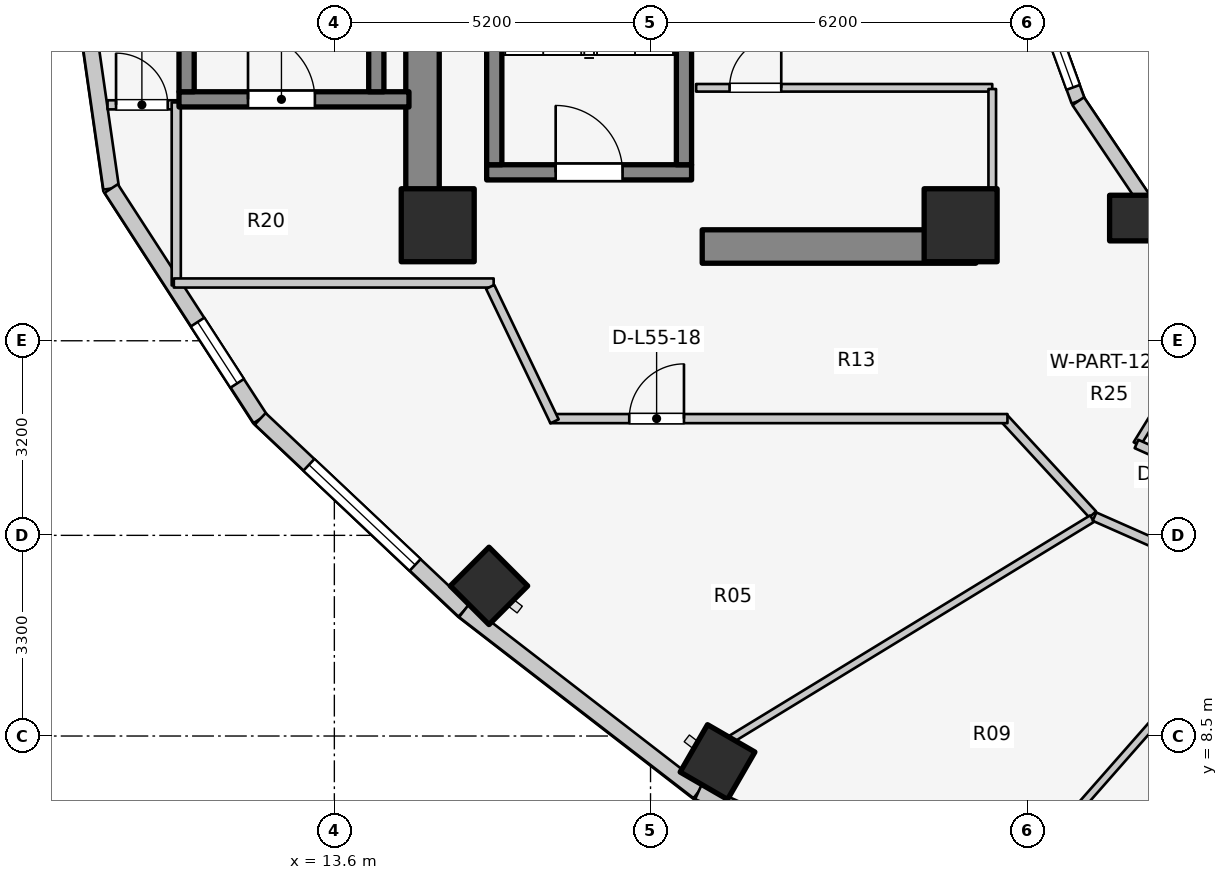
"""IFC4 building model, lengths in metres.
Left out: names, types, materials, properties, quantities, classifications, styles, units other than length and angle.
Written with IfcOpenShell. Run it as: python <this file> out.ifc"""

import sys

from ifc_helpers import new_model, si_unit, direction, frame, frame_2d, origin, origin_2d, place, context, subcontext, project, spatial, rectangle, extrude, element, fill, save


model = new_model("IFC4")
c1 = context("Model", 3, precision=1e-05, world=origin(), true_north=direction((0.0, 1.0)))
c2 = subcontext(c1, "Body", "Model", "MODEL_VIEW")
j1 = project(units=[si_unit("LENGTHUNIT", "METRE"), si_unit("PLANEANGLEUNIT", "RADIAN")], contexts=[c1])
p1 = place(None, origin())
s1 = spatial("IfcSite", under=j1, at=p1, CompositionType="ELEMENT")
p2 = place(p1, origin())
s2 = spatial("IfcBuilding", under=s1, at=p2, CompositionType="ELEMENT")
p3 = place(p2, frame((0.0, 0.0, 180.8)))
s3 = spatial("IfcBuildingStorey", under=s2, at=p3, CompositionType="ELEMENT", Elevation=180.8)
p4 = place(p3, frame((15.05, 17.05, 0.0), z_axis=(0.0, 0.0, 1.0), x_axis=(0.0, 1.0, 0.0)))
e1 = element("IfcWall", 1, at=p4, inside=s3, PredefinedType="SHEAR", context=c2, shape_type="SweptSolid", body=[
    extrude(rectangle(XDim=12.8, YDim=0.55, at=frame_2d((6.4, 0.0))), origin(), (0.0, 0.0, 1.0), 3.1),
])
p5 = place(p3, frame((19.65, 16.55, 0.0), z_axis=(0.0, 0.0, 1.0), x_axis=(1.0, 0.0, 0.0)))
e2 = element("IfcWall", 2, at=p5, inside=s3, PredefinedType="SHEAR", context=c2, shape_type="SweptSolid", body=[
    extrude(rectangle(XDim=4.5, YDim=0.55, at=frame_2d((2.25, 0.0))), origin(), (0.0, 0.0, 1.0), 3.1),
])
p6 = place(p3, frame((16.105, 17.77, 0.0), z_axis=(0.0, 0.0, 1.0), x_axis=(1.0, 0.0, 0.0)))
e3 = element("IfcWall", 3, at=p6, inside=s3, PredefinedType="SOLIDWALL", context=c2, shape_type="SweptSolid", body=[
    extrude(rectangle(XDim=3.37, YDim=0.25, at=frame_2d((1.685, 0.0))), origin(), (0.0, 0.0, 1.0), 3.1),
])
p7 = place(p6, frame((1.135, 0.0, 0.0)))
e4 = element("IfcOpeningElement", 4, at=p7, cuts=e3, PredefinedType="OPENING", context=c2, shape_type="SweptSolid", body=[
    extrude(rectangle(XDim=1.1, YDim=2.1, at=frame_2d((0.55, 1.05))), frame((0.0, 0.135, 0.0), z_axis=(0.0, -1.0, 0.0), x_axis=(1.0, 0.0, 0.0)), (0.0, 0.0, 1.0), 0.27),
])
for number, where, z_axis, x_axis in (
    (5, (16.23, 17.895, 0.0), (0.0, 0.0, 1.0), (0.0, 1.0, 0.0)),
    (6, (19.35, 17.895, 0.0), (0.0, 0.0, 1.0), (0.0, 1.0, 0.0)),
):
    element("IfcWall", number, at=place(p3, frame(where, z_axis=z_axis, x_axis=x_axis)), inside=s3, PredefinedType="SOLIDWALL", context=c2, shape_type="SweptSolid", body=[
        extrude(rectangle(XDim=7.81, YDim=0.25, at=frame_2d((3.905, 0.0))), origin(), (0.0, 0.0, 1.0), 3.1),
    ])
p8 = place(p3, frame((11.045, 18.97, 0.0), z_axis=(0.0, 0.0, 1.0), x_axis=(1.0, 0.0, 0.0)))
e7 = element("IfcWall", 7, at=p8, inside=s3, PredefinedType="SOLIDWALL", context=c2, shape_type="SweptSolid", body=[
    extrude(rectangle(XDim=3.782, YDim=0.25, at=frame_2d((1.891, 0.0))), origin(), (0.0, 0.0, 1.0), 3.1),
])
p9 = place(p8, frame((1.135, 0.0, 0.0)))
e8 = element("IfcOpeningElement", 8, at=p9, cuts=e7, PredefinedType="OPENING", context=c2, shape_type="SweptSolid", body=[
    extrude(rectangle(XDim=1.1, YDim=2.1, at=frame_2d((0.55, 1.05))), frame((0.0, 0.135, 0.0), z_axis=(0.0, -1.0, 0.0), x_axis=(1.0, 0.0, 0.0)), (0.0, 0.0, 1.0), 0.27),
])
for number, where, z_axis, x_axis in (
    (9, (11.17, 19.095, 0.0), (0.0, 0.0, 1.0), (0.0, 1.0, 0.0)),
    (10, (14.29, 19.095, 0.0), (0.0, 0.0, 1.0), (0.0, 1.0, 0.0)),
):
    element("IfcWall", number, at=place(p3, frame(where, z_axis=z_axis, x_axis=x_axis)), inside=s3, PredefinedType="SOLIDWALL", context=c2, shape_type="SweptSolid", body=[
        extrude(rectangle(XDim=7.81, YDim=0.25, at=frame_2d((3.905, 0.0))), origin(), (0.0, 0.0, 1.0), 3.1),
    ])
for number, where, z_axis, x_axis in (
    (11, (15.3, 16.9, 0.0), (0.0, 0.0, 1.0), (1.0, 0.0, 0.0)),
    (12, (23.9, 16.9, 0.0), (0.0, 0.0, 1.0), (1.0, 0.0, 0.0)),
):
    element("IfcColumn", number, at=place(p3, frame(where, z_axis=z_axis, x_axis=x_axis)), inside=s3, PredefinedType="COLUMN", context=c2, shape_type="SweptSolid", body=[
        extrude(rectangle(XDim=1.2, YDim=1.2, at=origin_2d()), origin(), (0.0, 0.0, 1.0), 3.1),
    ])
p10 = place(p3, frame((26.725, 17.018, 0.0), z_axis=(0.0, 0.0, 1.0), x_axis=(1.0, 0.0, 0.0)))
e13 = element("IfcColumn", 13, at=p10, inside=s3, PredefinedType="COLUMN", context=c2, shape_type="SweptSolid", body=[
    extrude(rectangle(XDim=0.75, YDim=0.75, at=origin_2d()), origin(), (0.0, 0.0, 1.0), 3.1),
])
for number, where, z_axis, x_axis in (
    (14, (16.143, 10.969, 0.0), (0.0, 0.0, 1.0), (-0.707, -0.707, 0.0)),
    (15, (19.902, 8.072, 0.0), (0.0, 0.0, 1.0), (-0.5, -0.866, 0.0)),
):
    element("IfcColumn", number, at=place(p3, frame(where, z_axis=z_axis, x_axis=x_axis)), inside=s3, PredefinedType="COLUMN", context=c2, shape_type="SweptSolid", body=[
        extrude(rectangle(XDim=0.9, YDim=0.9, at=origin_2d()), origin(), (0.0, 0.0, 1.0), 3.1),
    ])
p11 = place(p3, frame((25.123, 20.898, 0.0), z_axis=(0.0, 0.0, 1.0), x_axis=(0.341423187295, -0.93990968033, 0.0)))
e16 = element("IfcWall", 16, at=p11, inside=s3, PredefinedType="STANDARD", context=c2, shape_type="SweptSolid", body=[
    extrude(rectangle(XDim=2.084, YDim=0.23, at=frame_2d((1.042, 0.0))), origin(), (0.0, 0.0, 1.0), 2.84),
])
p12 = place(p11, frame((0.242, 0.0, 0.85)))
e17 = element("IfcOpeningElement", 17, at=p12, cuts=e16, PredefinedType="OPENING", context=c2, shape_type="SweptSolid", body=[
    extrude(rectangle(XDim=1.6, YDim=1.65, at=frame_2d((0.8, 0.825))), frame((0.0, 0.125, 0.0), z_axis=(0.0, -1.0, 0.0), x_axis=(1.0, 0.0, 0.0)), (0.0, 0.0, 1.0), 0.25),
])
p13 = place(p3, frame((25.834, 18.94, 0.0), z_axis=(0.0, 0.0, 1.0), x_axis=(0.558197800898, -0.829707909492, 0.0)))
e18 = element("IfcWall", 18, at=p13, inside=s3, PredefinedType="STANDARD", context=c2, shape_type="SweptSolid", body=[
    extrude(rectangle(XDim=2.027, YDim=0.23, at=frame_2d((1.013, 0.0))), origin(), (0.0, 0.0, 1.0), 2.16),
])
p14 = place(p3, frame((26.965, 17.258, 0.0), z_axis=(0.0, 0.0, 1.0), x_axis=(0.752576694707, -0.658504607869, 0.0)))
e19 = element("IfcWall", 19, at=p14, inside=s3, PredefinedType="STANDARD", context=c2, shape_type="SweptSolid", body=[
    extrude(rectangle(XDim=1.959, YDim=0.23, at=frame_2d((0.98, 0.0))), origin(), (0.0, 0.0, 1.0), 2.16),
])
p15 = place(p3, frame((9.14, 23.0, 0.0), z_axis=(0.0, 0.0, 1.0), x_axis=(0.142227632286, -0.989833976288, 0.0)))
e20 = element("IfcWall", 20, at=p15, inside=s3, PredefinedType="STANDARD", context=c2, shape_type="SweptSolid", body=[
    extrude(rectangle(XDim=5.553, YDim=0.26, at=frame_2d((2.776, 0.0))), origin(), (0.0, 0.0, 1.0), 2.85),
])
p16 = place(p15, frame((1.506, 0.0, 0.75)))
e21 = element("IfcOpeningElement", 21, at=p16, cuts=e20, PredefinedType="OPENING", context=c2, shape_type="SweptSolid", body=[
    extrude(rectangle(XDim=1.2, YDim=1.5, at=frame_2d((0.6, 0.75))), frame((0.0, 0.14, 0.0), z_axis=(0.0, -1.0, 0.0), x_axis=(1.0, 0.0, 0.0)), (0.0, 0.0, 1.0), 0.28),
])
p17 = place(p3, frame((9.93, 17.503, 0.0), z_axis=(0.0, 0.0, 1.0), x_axis=(0.543358984534, -0.839500454989, 0.0)))
e22 = element("IfcWall", 22, at=p17, inside=s3, PredefinedType="STANDARD", context=c2, shape_type="SweptSolid", body=[
    extrude(rectangle(XDim=4.511, YDim=0.26, at=frame_2d((2.256, 0.0))), origin(), (0.0, 0.0, 1.0), 2.85),
])
p18 = place(p17, frame((2.615, 0.0, 0.75)))
e23 = element("IfcOpeningElement", 23, at=p18, cuts=e22, PredefinedType="OPENING", context=c2, shape_type="SweptSolid", body=[
    extrude(rectangle(XDim=1.2, YDim=1.5, at=frame_2d((0.6, 0.75))), frame((0.0, 0.14, 0.0), z_axis=(0.0, -1.0, 0.0), x_axis=(1.0, 0.0, 0.0)), (0.0, 0.0, 1.0), 0.28),
])
p19 = place(p3, frame((12.381, 13.716, 0.0), z_axis=(0.0, 0.0, 1.0), x_axis=(0.727667301037, -0.68593024354, 0.0)))
e24 = element("IfcWall", 24, at=p19, inside=s3, PredefinedType="STANDARD", context=c2, shape_type="SweptSolid", body=[
    extrude(rectangle(XDim=4.604, YDim=0.26, at=frame_2d((2.302, 0.0))), origin(), (0.0, 0.0, 1.0), 2.85),
])
p20 = place(p19, frame((1.102, 0.0, 0.75)))
e25 = element("IfcOpeningElement", 25, at=p20, cuts=e24, PredefinedType="OPENING", context=c2, shape_type="SweptSolid", body=[
    extrude(rectangle(XDim=2.4, YDim=1.7, at=frame_2d((1.2, 0.85))), frame((0.0, 0.14, 0.0), z_axis=(0.0, -1.0, 0.0), x_axis=(1.0, 0.0, 0.0)), (0.0, 0.0, 1.0), 0.28),
])
p21 = place(p3, frame((15.731, 10.559, 0.0), z_axis=(0.0, 0.0, 1.0), x_axis=(0.791460185804, -0.611220724687, 0.0)))
e26 = element("IfcWall", 26, at=p21, inside=s3, PredefinedType="STANDARD", context=c2, shape_type="SweptSolid", body=[
    extrude(rectangle(XDim=4.872, YDim=0.26, at=frame_2d((2.436, 0.0))), origin(), (0.0, 0.0, 1.0), 2.85),
])
p22 = place(p3, frame((19.587, 7.581, 0.0), z_axis=(0.0, 0.0, 1.0), x_axis=(0.912353637112, -0.409403029847, 0.0)))
e27 = element("IfcWall", 27, at=p22, inside=s3, PredefinedType="STANDARD", context=c2, shape_type="SweptSolid", body=[
    extrude(rectangle(XDim=5.533, YDim=0.26, at=frame_2d((2.766, 0.0))), origin(), (0.0, 0.0, 1.0), 2.85),
])
p23 = place(p22, frame((2.016, 0.0, 0.75)))
e28 = element("IfcOpeningElement", 28, at=p23, cuts=e27, PredefinedType="OPENING", context=c2, shape_type="SweptSolid", body=[
    extrude(rectangle(XDim=1.5, YDim=1.6, at=frame_2d((0.75, 0.8))), frame((0.0, 0.14, 0.0), z_axis=(0.0, -1.0, 0.0), x_axis=(1.0, 0.0, 0.0)), (0.0, 0.0, 1.0), 0.28),
])
p24 = place(p3, frame((19.55, 19.16, 0.0), z_axis=(0.0, 0.0, 1.0), x_axis=(1.0, 0.0, 0.0)))
e29 = element("IfcWall", 29, at=p24, inside=s3, PredefinedType="PARTITIONING", context=c2, shape_type="SweptSolid", body=[
    extrude(rectangle(XDim=4.87, YDim=0.125, at=frame_2d((2.435, 0.0))), origin(), (0.0, 0.0, 1.0), 2.12),
])
p25 = place(p24, frame((0.55, 0.0, 0.0)))
e30 = element("IfcOpeningElement", 30, at=p25, cuts=e29, PredefinedType="OPENING", context=c2, shape_type="SweptSolid", body=[
    extrude(rectangle(XDim=0.85, YDim=2.05, at=frame_2d((0.425, 1.025))), frame((0.0, 0.073, 0.0), z_axis=(0.0, -1.0, 0.0), x_axis=(1.0, 0.0, 0.0)), (0.0, 0.0, 1.0), 0.145),
])
p26 = place(p3, frame((24.42, 17.1, 0.0), z_axis=(0.0, 0.0, 1.0), x_axis=(0.0, 1.0, 0.0)))
e31 = element("IfcWall", 31, at=p26, inside=s3, PredefinedType="PARTITIONING", context=c2, shape_type="SweptSolid", body=[
    extrude(rectangle(XDim=2.04, YDim=0.125, at=frame_2d((1.02, 0.0))), origin(), (0.0, 0.0, 1.0), 2.232),
])
p27 = place(p3, frame((9.87, 18.88, 0.0), z_axis=(0.0, 0.0, 1.0), x_axis=(1.0, 0.0, 0.0)))
e32 = element("IfcWall", 32, at=p27, inside=s3, PredefinedType="PARTITIONING", context=c2, shape_type="SweptSolid", body=[
    extrude(rectangle(XDim=1.17, YDim=0.15, at=frame_2d((0.585, 0.0))), origin(), (0.0, 0.0, 1.0), 2.855),
])
p28 = place(p27, frame((0.14, 0.0, 0.0)))
e33 = element("IfcOpeningElement", 33, at=p28, cuts=e32, PredefinedType="OPENING", context=c2, shape_type="SweptSolid", body=[
    extrude(rectangle(XDim=0.85, YDim=2.05, at=frame_2d((0.425, 1.025))), frame((0.0, 0.085, 0.0), z_axis=(0.0, -1.0, 0.0), x_axis=(1.0, 0.0, 0.0)), (0.0, 0.0, 1.0), 0.17),
])
p29 = place(p3, frame((11.0, 15.91, 0.0), z_axis=(0.0, 0.0, 1.0), x_axis=(0.0, 1.0, 0.0)))
e34 = element("IfcWall", 34, at=p29, inside=s3, PredefinedType="PARTITIONING", context=c2, shape_type="SweptSolid", body=[
    extrude(rectangle(XDim=3.01, YDim=0.15, at=frame_2d((1.505, 0.0))), origin(), (0.0, 0.0, 1.0), 2.855),
])
p30 = place(p3, frame((10.96, 15.95, 0.0), z_axis=(0.0, 0.0, 1.0), x_axis=(1.0, 0.0, 0.0)))
e35 = element("IfcWall", 35, at=p30, inside=s3, PredefinedType="PARTITIONING", context=c2, shape_type="SweptSolid", body=[
    extrude(rectangle(XDim=5.26, YDim=0.15, at=frame_2d((2.63, 0.0))), origin(), (0.0, 0.0, 1.0), 2.22),
])
p31 = place(p3, frame((26.072, 12.144, 0.0), z_axis=(0.0, 0.0, 1.0), x_axis=(-0.677579737957, 0.735449317567, 0.0)))
e36 = element("IfcWall", 36, at=p31, inside=s3, PredefinedType="PARTITIONING", context=c2, shape_type="SweptSolid", body=[
    extrude(rectangle(XDim=2.173, YDim=0.15, at=frame_2d((1.086, 0.0))), origin(), (0.0, 0.0, 1.0), 2.299),
])
p32 = place(p3, frame((17.15, 13.72, 0.0), z_axis=(0.0, 0.0, 1.0), x_axis=(1.0, 0.0, 0.0)))
e37 = element("IfcWall", 37, at=p32, inside=s3, PredefinedType="PARTITIONING", context=c2, shape_type="SweptSolid", body=[
    extrude(rectangle(XDim=7.52, YDim=0.15, at=frame_2d((3.76, 0.0))), origin(), (0.0, 0.0, 1.0), 2.299),
])
p33 = place(p32, frame((1.3, 0.0, 0.0)))
e38 = element("IfcOpeningElement", 38, at=p33, cuts=e37, PredefinedType="OPENING", context=c2, shape_type="SweptSolid", body=[
    extrude(rectangle(XDim=0.9, YDim=2.1, at=frame_2d((0.45, 1.05))), frame((0.0, 0.085, 0.0), z_axis=(0.0, -1.0, 0.0), x_axis=(1.0, 0.0, 0.0)), (0.0, 0.0, 1.0), 0.17),
])
p34 = place(p3, frame((17.222, 13.675, 0.0), z_axis=(0.0, 0.0, 1.0), x_axis=(-0.431973389813, 0.901886351207, 0.0)))
e39 = element("IfcWall", 39, at=p34, inside=s3, PredefinedType="PARTITIONING", context=c2, shape_type="SweptSolid", body=[
    extrude(rectangle(XDim=2.452, YDim=0.15, at=frame_2d((1.226, 0.0))), origin(), (0.0, 0.0, 1.0), 2.855),
])
p35 = place(p3, frame((28.45, 15.985, 0.0), z_axis=(0.0, 0.0, 1.0), x_axis=(-0.523587550846, -0.851971875474, 0.0)))
e40 = element("IfcWall", 40, at=p35, inside=s3, PredefinedType="PARTITIONING", context=c2, shape_type="SweptSolid", body=[
    extrude(rectangle(XDim=3.153, YDim=0.125, at=frame_2d((1.577, 0.0))), origin(), (0.0, 0.0, 1.0), 2.299),
])
p36 = place(p3, frame((26.793, 13.303, 0.0), z_axis=(0.0, 0.0, 1.0), x_axis=(0.913145536541, -0.407633694749, 0.0)))
e41 = element("IfcWall", 41, at=p36, inside=s3, PredefinedType="PARTITIONING", context=c2, shape_type="SweptSolid", body=[
    extrude(rectangle(XDim=2.756, YDim=0.15, at=frame_2d((1.378, 0.0))), origin(), (0.0, 0.0, 1.0), 2.299),
])
p37 = place(p3, frame((26.062, 12.075, 0.0), z_axis=(0.0, 0.0, 1.0), x_axis=(-0.853440334679, -0.521190555501, 0.0)))
e42 = element("IfcWall", 42, at=p37, inside=s3, PredefinedType="PARTITIONING", context=c2, shape_type="SweptSolid", body=[
    extrude(rectangle(XDim=6.966, YDim=0.125, at=frame_2d((3.483, 0.0))), origin(), (0.0, 0.0, 1.0), 2.299),
])
p38 = place(p3, frame((28.914, 10.805, 0.0), z_axis=(0.0, 0.0, 1.0), x_axis=(-0.660581320981, -0.750754499401, 0.0)))
e43 = element("IfcWall", 43, at=p38, inside=s3, PredefinedType="PARTITIONING", context=c2, shape_type="SweptSolid", body=[
    extrude(rectangle(XDim=6.027, YDim=0.125, at=frame_2d((3.013, 0.0))), origin(), (0.0, 0.0, 1.0), 2.299),
])
p39 = place(p3, frame((26.102, 12.108, 0.0), z_axis=(0.0, 0.0, 1.0), x_axis=(0.914519212393, -0.40454247016, 0.0)))
e44 = element("IfcWall", 44, at=p39, inside=s3, PredefinedType="PARTITIONING", context=c2, shape_type="SweptSolid", body=[
    extrude(rectangle(XDim=3.124, YDim=0.15, at=frame_2d((1.562, 0.0))), origin(), (0.0, 0.0, 1.0), 2.299),
])
p40 = place(p39, frame((1.062, 0.0, 0.0)))
e45 = element("IfcOpeningElement", 45, at=p40, cuts=e44, PredefinedType="OPENING", context=c2, shape_type="SweptSolid", body=[
    extrude(rectangle(XDim=1.0, YDim=2.1, at=frame_2d((0.5, 1.05))), frame((0.0, 0.085, 0.0), z_axis=(0.0, -1.0, 0.0), x_axis=(1.0, 0.0, 0.0)), (0.0, 0.0, 1.0), 0.17),
])
p41 = place(p12, origin())
e46 = element("IfcWindow", 46, at=p41, inside=s3, PartitioningType="SINGLE_PANEL", PredefinedType="WINDOW", context=c2, shape_type="SweptSolid", body=[
    extrude(rectangle(XDim=1.6, YDim=1.65, at=frame_2d((0.8, 0.825))), frame((0.0, 0.03, 0.0), z_axis=(0.0, -1.0, 0.0), x_axis=(1.0, 0.0, 0.0)), (0.0, 0.0, 1.0), 0.06),
])
fill(e17, e46)
p42 = place(p18, origin())
e47 = element("IfcWindow", 47, at=p42, inside=s3, PartitioningType="SINGLE_PANEL", PredefinedType="WINDOW", context=c2, shape_type="SweptSolid", body=[
    extrude(rectangle(XDim=1.2, YDim=1.5, at=frame_2d((0.6, 0.75))), frame((0.0, 0.03, 0.0), z_axis=(0.0, -1.0, 0.0), x_axis=(1.0, 0.0, 0.0)), (0.0, 0.0, 1.0), 0.06),
])
fill(e23, e47)
p43 = place(p20, origin())
e48 = element("IfcWindow", 48, at=p43, inside=s3, PartitioningType="SINGLE_PANEL", PredefinedType="WINDOW", context=c2, shape_type="SweptSolid", body=[
    extrude(rectangle(XDim=2.4, YDim=1.7, at=frame_2d((1.2, 0.85))), frame((0.0, 0.03, 0.0), z_axis=(0.0, -1.0, 0.0), x_axis=(1.0, 0.0, 0.0)), (0.0, 0.0, 1.0), 0.06),
])
fill(e25, e48)
p44 = place(p7, origin())
e49 = element("IfcDoor", 49, at=p44, inside=s3, OperationType="SINGLE_SWING_LEFT", PredefinedType="DOOR", context=c2, shape_type="SweptSolid", body=[
    extrude(rectangle(XDim=1.1, YDim=2.1, at=frame_2d((0.55, 1.05))), frame((0.0, 0.025, 0.0), z_axis=(0.0, -1.0, 0.0), x_axis=(1.0, 0.0, 0.0)), (0.0, 0.0, 1.0), 0.05),
])
fill(e4, e49)
p45 = place(p9, origin())
e50 = element("IfcDoor", 50, at=p45, inside=s3, OperationType="SINGLE_SWING_LEFT", PredefinedType="DOOR", context=c2, shape_type="SweptSolid", body=[
    extrude(rectangle(XDim=1.1, YDim=2.1, at=frame_2d((0.55, 1.05))), frame((0.0, 0.025, 0.0), z_axis=(0.0, -1.0, 0.0), x_axis=(1.0, 0.0, 0.0)), (0.0, 0.0, 1.0), 0.05),
])
fill(e8, e50)
p46 = place(p25, origin())
e51 = element("IfcDoor", 51, at=p46, inside=s3, OperationType="SINGLE_SWING_RIGHT", PredefinedType="DOOR", context=c2, shape_type="SweptSolid", body=[
    extrude(rectangle(XDim=0.85, YDim=2.05, at=frame_2d((0.425, 1.025))), frame((0.0, 0.025, 0.0), z_axis=(0.0, -1.0, 0.0), x_axis=(1.0, 0.0, 0.0)), (0.0, 0.0, 1.0), 0.05),
])
fill(e30, e51)
p47 = place(p28, origin())
e52 = element("IfcDoor", 52, at=p47, inside=s3, OperationType="SINGLE_SWING_LEFT", PredefinedType="DOOR", context=c2, shape_type="SweptSolid", body=[
    extrude(rectangle(XDim=0.85, YDim=2.05, at=frame_2d((0.425, 1.025))), frame((0.0, 0.025, 0.0), z_axis=(0.0, -1.0, 0.0), x_axis=(1.0, 0.0, 0.0)), (0.0, 0.0, 1.0), 0.05),
])
fill(e33, e52)
p48 = place(p33, origin())
e53 = element("IfcDoor", 53, at=p48, inside=s3, OperationType="SINGLE_SWING_RIGHT", PredefinedType="DOOR", context=c2, shape_type="SweptSolid", body=[
    extrude(rectangle(XDim=0.9, YDim=2.1, at=frame_2d((0.45, 1.05))), frame((0.0, 0.025, 0.0), z_axis=(0.0, -1.0, 0.0), x_axis=(1.0, 0.0, 0.0)), (0.0, 0.0, 1.0), 0.05),
])
fill(e38, e53)
save(model, sys.argv[1])
